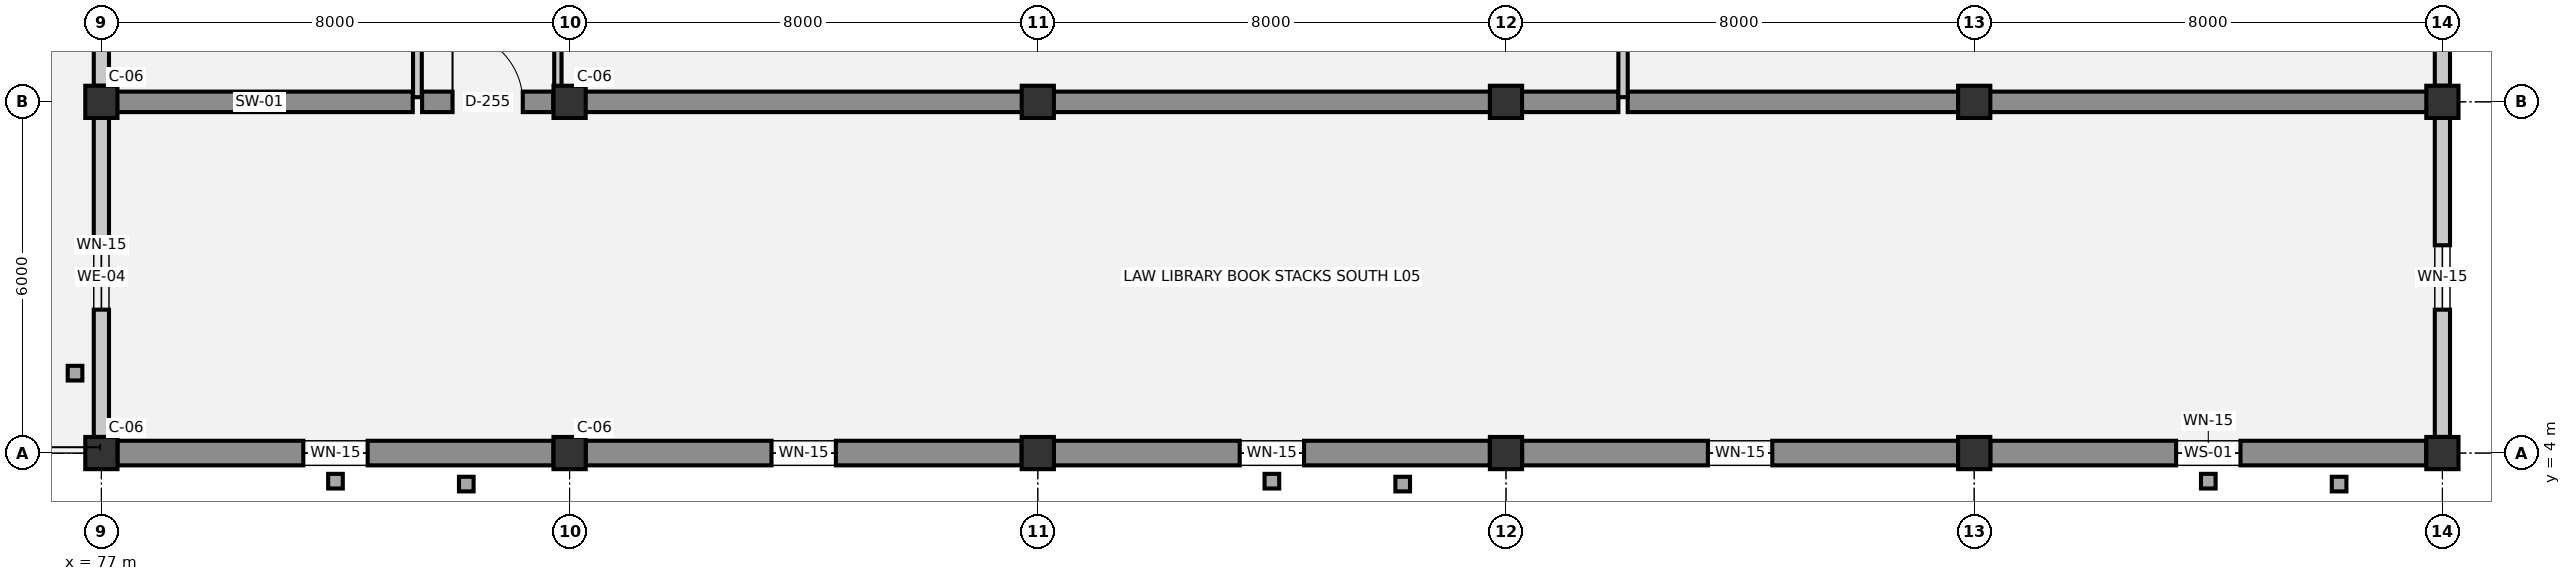
"""IFC4 building model, lengths in metres.
Left out: names, types, materials, properties, quantities, classifications, styles, units other than length and angle.
Written with IfcOpenShell. Run it as: python <this file> out.ifc"""

import sys

from ifc_helpers import new_model, si_unit, direction, frame, frame_2d, origin, origin_2d, place, context, subcontext, project, spatial, rectangle, extrude, element, fill, save


model = new_model("IFC4")
c1 = context("Model", 3, precision=1e-05, world=origin(), true_north=direction((0.0, 1.0)))
c2 = subcontext(c1, "Body", "Model", "MODEL_VIEW")
j1 = project(units=[si_unit("LENGTHUNIT", "METRE"), si_unit("PLANEANGLEUNIT", "RADIAN")], contexts=[c1])
p1 = place(None, origin())
s1 = spatial("IfcSite", under=j1, at=p1, CompositionType="ELEMENT")
p2 = place(p1, origin())
s2 = spatial("IfcBuilding", under=s1, at=p2, CompositionType="ELEMENT")
p3 = place(p2, frame((0.0, 0.0, 18.3)))
s3 = spatial("IfcBuildingStorey", under=s2, at=p3, CompositionType="ELEMENT", Elevation=18.3)
for number, where, z_axis, x_axis in (
    (1, (77.0, 4.0, 0.0), (0.0, 0.0, 1.0), (1.0, 0.0, 0.0)),
    (2, (77.0, 10.0, 0.0), (0.0, 0.0, 1.0), (1.0, 0.0, 0.0)),
    (3, (85.0, 4.0, 0.0), (0.0, 0.0, 1.0), (1.0, 0.0, 0.0)),
    (4, (85.0, 10.0, 0.0), (0.0, 0.0, 1.0), (1.0, 0.0, 0.0)),
    (5, (93.0, 4.0, 0.0), (0.0, 0.0, 1.0), (1.0, 0.0, 0.0)),
    (6, (93.0, 10.0, 0.0), (0.0, 0.0, 1.0), (1.0, 0.0, 0.0)),
    (7, (101.0, 4.0, 0.0), (0.0, 0.0, 1.0), (1.0, 0.0, 0.0)),
    (8, (101.0, 10.0, 0.0), (0.0, 0.0, 1.0), (1.0, 0.0, 0.0)),
    (9, (109.0, 4.0, 0.0), (0.0, 0.0, 1.0), (1.0, 0.0, 0.0)),
    (10, (109.0, 10.0, 0.0), (0.0, 0.0, 1.0), (1.0, 0.0, 0.0)),
    (11, (117.0, 4.0, 0.0), (0.0, 0.0, 1.0), (1.0, 0.0, 0.0)),
    (12, (117.0, 10.0, 0.0), (0.0, 0.0, 1.0), (1.0, 0.0, 0.0)),
):
    element("IfcColumn", number, at=place(p3, frame(where, z_axis=z_axis, x_axis=x_axis)), inside=s3, PredefinedType="COLUMN", context=c2, shape_type="SweptSolid", body=[
        extrude(rectangle(XDim=0.55, YDim=0.55, at=origin_2d()), origin(), (0.0, 0.0, 1.0), 3.75),
    ])
p4 = place(p3, frame((77.0, 4.275, 0.0), z_axis=(0.0, 0.0, 1.0), x_axis=(0.0, 1.0, 0.0)))
e13 = element("IfcWall", 13, at=p4, inside=s3, PredefinedType="SOLIDWALL", context=c2, shape_type="SweptSolid", body=[
    extrude(rectangle(XDim=5.45, YDim=0.26, at=frame_2d((2.725, 0.0))), origin(), (0.0, 0.0, 1.0), 2.69),
])
p5 = place(p4, frame((2.175, 0.0, 0.9)))
e14 = element("IfcOpeningElement", 14, at=p5, cuts=e13, PredefinedType="OPENING", context=c2, shape_type="SweptSolid", body=[
    extrude(rectangle(XDim=1.1, YDim=1.2, at=frame_2d((0.55, 0.6))), frame((0.0, 0.14, 0.0), z_axis=(0.0, -1.0, 0.0), x_axis=(1.0, 0.0, 0.0)), (0.0, 0.0, 1.0), 0.28),
])
p6 = place(p3, frame((77.0, 10.275, 0.0), z_axis=(0.0, 0.0, 1.0), x_axis=(0.0, 1.0, 0.0)))
e15 = element("IfcWall", 15, at=p6, inside=s3, PredefinedType="SOLIDWALL", context=c2, shape_type="SweptSolid", body=[
    extrude(rectangle(XDim=6.45, YDim=0.26, at=frame_2d((3.225, 0.0))), origin(), (0.0, 0.0, 1.0), 2.69),
])
p7 = place(p6, frame((2.125, 0.0, 0.9)))
e16 = element("IfcOpeningElement", 16, at=p7, cuts=e15, PredefinedType="OPENING", context=c2, shape_type="SweptSolid", body=[
    extrude(rectangle(XDim=2.2, YDim=1.0, at=frame_2d((1.1, 0.5))), frame((0.0, 0.14, 0.0), z_axis=(0.0, -1.0, 0.0), x_axis=(1.0, 0.0, 0.0)), (0.0, 0.0, 1.0), 0.28),
])
p8 = place(p3, frame((117.0, 16.725, 0.0), z_axis=(0.0, 0.0, 1.0), x_axis=(0.0, -1.0, 0.0)))
e17 = element("IfcWall", 17, at=p8, inside=s3, PredefinedType="SOLIDWALL", context=c2, shape_type="SweptSolid", body=[
    extrude(rectangle(XDim=6.45, YDim=0.26, at=frame_2d((3.225, 0.0))), origin(), (0.0, 0.0, 1.0), 2.69),
])
p9 = place(p8, frame((2.125, 0.0, 0.9)))
e18 = element("IfcOpeningElement", 18, at=p9, cuts=e17, PredefinedType="OPENING", context=c2, shape_type="SweptSolid", body=[
    extrude(rectangle(XDim=2.2, YDim=1.0, at=frame_2d((1.1, 0.5))), frame((0.0, 0.14, 0.0), z_axis=(0.0, -1.0, 0.0), x_axis=(1.0, 0.0, 0.0)), (0.0, 0.0, 1.0), 0.28),
])
p10 = place(p3, frame((117.0, 9.725, 0.0), z_axis=(0.0, 0.0, 1.0), x_axis=(0.0, -1.0, 0.0)))
e19 = element("IfcWall", 19, at=p10, inside=s3, PredefinedType="SOLIDWALL", context=c2, shape_type="SweptSolid", body=[
    extrude(rectangle(XDim=5.45, YDim=0.26, at=frame_2d((2.725, 0.0))), origin(), (0.0, 0.0, 1.0), 2.69),
])
p11 = place(p10, frame((2.175, 0.0, 0.9)))
e20 = element("IfcOpeningElement", 20, at=p11, cuts=e19, PredefinedType="OPENING", context=c2, shape_type="SweptSolid", body=[
    extrude(rectangle(XDim=1.1, YDim=1.2, at=frame_2d((0.55, 0.6))), frame((0.0, 0.14, 0.0), z_axis=(0.0, -1.0, 0.0), x_axis=(1.0, 0.0, 0.0)), (0.0, 0.0, 1.0), 0.28),
])
p12 = place(p3, frame((116.725, 4.0, 0.0), z_axis=(0.0, 0.0, 1.0), x_axis=(-1.0, 0.0, 0.0)))
e21 = element("IfcWall", 21, at=p12, inside=s3, PredefinedType="SOLIDWALL", context=c2, shape_type="SweptSolid", body=[
    extrude(rectangle(XDim=7.45, YDim=0.42, at=frame_2d((3.725, 0.0))), origin(), (0.0, 0.0, 1.0), 2.69),
])
p13 = place(p12, frame((3.175, 0.0, 0.9)))
e22 = element("IfcOpeningElement", 22, at=p13, cuts=e21, PredefinedType="OPENING", context=c2, shape_type="SweptSolid", body=[
    extrude(rectangle(XDim=1.1, YDim=1.2, at=frame_2d((0.55, 0.6))), frame((0.0, 0.22, 0.0), z_axis=(0.0, -1.0, 0.0), x_axis=(1.0, 0.0, 0.0)), (0.0, 0.0, 1.0), 0.44),
])
p14 = place(p3, frame((108.725, 4.0, 0.0), z_axis=(0.0, 0.0, 1.0), x_axis=(-1.0, 0.0, 0.0)))
e23 = element("IfcWall", 23, at=p14, inside=s3, PredefinedType="SOLIDWALL", context=c2, shape_type="SweptSolid", body=[
    extrude(rectangle(XDim=7.45, YDim=0.42, at=frame_2d((3.725, 0.0))), origin(), (0.0, 0.0, 1.0), 2.69),
])
p15 = place(p14, frame((3.175, 0.0, 0.9)))
e24 = element("IfcOpeningElement", 24, at=p15, cuts=e23, PredefinedType="OPENING", context=c2, shape_type="SweptSolid", body=[
    extrude(rectangle(XDim=1.1, YDim=1.2, at=frame_2d((0.55, 0.6))), frame((0.0, 0.22, 0.0), z_axis=(0.0, -1.0, 0.0), x_axis=(1.0, 0.0, 0.0)), (0.0, 0.0, 1.0), 0.44),
])
p16 = place(p3, frame((100.725, 4.0, 0.0), z_axis=(0.0, 0.0, 1.0), x_axis=(-1.0, 0.0, 0.0)))
e25 = element("IfcWall", 25, at=p16, inside=s3, PredefinedType="SOLIDWALL", context=c2, shape_type="SweptSolid", body=[
    extrude(rectangle(XDim=7.45, YDim=0.42, at=frame_2d((3.725, 0.0))), origin(), (0.0, 0.0, 1.0), 2.69),
])
p17 = place(p16, frame((3.175, 0.0, 0.9)))
e26 = element("IfcOpeningElement", 26, at=p17, cuts=e25, PredefinedType="OPENING", context=c2, shape_type="SweptSolid", body=[
    extrude(rectangle(XDim=1.1, YDim=1.2, at=frame_2d((0.55, 0.6))), frame((0.0, 0.22, 0.0), z_axis=(0.0, -1.0, 0.0), x_axis=(1.0, 0.0, 0.0)), (0.0, 0.0, 1.0), 0.44),
])
p18 = place(p3, frame((92.725, 4.0, 0.0), z_axis=(0.0, 0.0, 1.0), x_axis=(-1.0, 0.0, 0.0)))
e27 = element("IfcWall", 27, at=p18, inside=s3, PredefinedType="SOLIDWALL", context=c2, shape_type="SweptSolid", body=[
    extrude(rectangle(XDim=7.45, YDim=0.42, at=frame_2d((3.725, 0.0))), origin(), (0.0, 0.0, 1.0), 2.69),
])
p19 = place(p18, frame((3.175, 0.0, 0.9)))
e28 = element("IfcOpeningElement", 28, at=p19, cuts=e27, PredefinedType="OPENING", context=c2, shape_type="SweptSolid", body=[
    extrude(rectangle(XDim=1.1, YDim=1.2, at=frame_2d((0.55, 0.6))), frame((0.0, 0.22, 0.0), z_axis=(0.0, -1.0, 0.0), x_axis=(1.0, 0.0, 0.0)), (0.0, 0.0, 1.0), 0.44),
])
p20 = place(p3, frame((84.725, 4.0, 0.0), z_axis=(0.0, 0.0, 1.0), x_axis=(-1.0, 0.0, 0.0)))
e29 = element("IfcWall", 29, at=p20, inside=s3, PredefinedType="SOLIDWALL", context=c2, shape_type="SweptSolid", body=[
    extrude(rectangle(XDim=7.45, YDim=0.42, at=frame_2d((3.725, 0.0))), origin(), (0.0, 0.0, 1.0), 2.69),
])
p21 = place(p20, frame((3.175, 0.0, 0.9)))
e30 = element("IfcOpeningElement", 30, at=p21, cuts=e29, PredefinedType="OPENING", context=c2, shape_type="SweptSolid", body=[
    extrude(rectangle(XDim=1.1, YDim=1.2, at=frame_2d((0.55, 0.6))), frame((0.0, 0.22, 0.0), z_axis=(0.0, -1.0, 0.0), x_axis=(1.0, 0.0, 0.0)), (0.0, 0.0, 1.0), 0.44),
])
p22 = place(p3, frame((77.08, 10.0, 0.0), z_axis=(0.0, 0.0, 1.0), x_axis=(1.0, 0.0, 0.0)))
e31 = element("IfcWall", 31, at=p22, inside=s3, PredefinedType="SHEAR", context=c2, shape_type="SweptSolid", body=[
    extrude(rectangle(XDim=5.24, YDim=0.35, at=frame_2d((2.62, 0.0))), origin(), (0.0, 0.0, 1.0), 3.39),
])
p23 = place(p3, frame((82.48, 10.0, 0.0), z_axis=(0.0, 0.0, 1.0), x_axis=(1.0, 0.0, 0.0)))
e32 = element("IfcWall", 32, at=p23, inside=s3, PredefinedType="SHEAR", context=c2, shape_type="SweptSolid", body=[
    extrude(rectangle(XDim=2.24, YDim=0.35, at=frame_2d((1.12, 0.0))), origin(), (0.0, 0.0, 1.0), 3.39),
])
p24 = place(p23, frame((0.52, 0.0, 0.0)))
e33 = element("IfcOpeningElement", 33, at=p24, cuts=e32, PredefinedType="OPENING", context=c2, shape_type="SweptSolid", body=[
    extrude(rectangle(XDim=1.2, YDim=2.15, at=frame_2d((0.6, 1.075))), frame((0.0, 0.185, 0.0), z_axis=(0.0, -1.0, 0.0), x_axis=(1.0, 0.0, 0.0)), (0.0, 0.0, 1.0), 0.37),
])
p25 = place(p3, frame((84.88, 10.0, 0.0), z_axis=(0.0, 0.0, 1.0), x_axis=(1.0, 0.0, 0.0)))
e34 = element("IfcWall", 34, at=p25, inside=s3, PredefinedType="SHEAR", context=c2, shape_type="SweptSolid", body=[
    extrude(rectangle(XDim=18.04, YDim=0.35, at=frame_2d((9.02, 0.0))), origin(), (0.0, 0.0, 1.0), 3.39),
])
p26 = place(p3, frame((103.08, 10.0, 0.0), z_axis=(0.0, 0.0, 1.0), x_axis=(1.0, 0.0, 0.0)))
e35 = element("IfcWall", 35, at=p26, inside=s3, PredefinedType="SHEAR", context=c2, shape_type="SweptSolid", body=[
    extrude(rectangle(XDim=13.84, YDim=0.35, at=frame_2d((6.92, 0.0))), origin(), (0.0, 0.0, 1.0), 3.39),
])
p27 = place(p3, frame((82.4, 10.08, 0.0), z_axis=(0.0, 0.0, 1.0), x_axis=(0.0, 1.0, 0.0)))
e36 = element("IfcWall", 36, at=p27, inside=s3, PredefinedType="PARTITIONING", context=c2, shape_type="SweptSolid", body=[
    extrude(rectangle(XDim=14.84, YDim=0.15, at=frame_2d((7.42, 0.0))), origin(), (0.0, 0.0, 1.0), 3.39),
])
p28 = place(p27, frame((6.81, 0.0, 0.0)))
e37 = element("IfcOpeningElement", 37, at=p28, cuts=e36, PredefinedType="OPENING", context=c2, shape_type="SweptSolid", body=[
    extrude(rectangle(XDim=1.22, YDim=2.2, at=frame_2d((0.61, 1.1))), frame((0.0, 0.085, 0.0), z_axis=(0.0, -1.0, 0.0), x_axis=(1.0, 0.0, 0.0)), (0.0, 0.0, 1.0), 0.17),
])
p29 = place(p3, frame((84.8, 10.08, 0.0), z_axis=(0.0, 0.0, 1.0), x_axis=(0.0, 1.0, 0.0)))
e38 = element("IfcWall", 38, at=p29, inside=s3, PredefinedType="PARTITIONING", context=c2, shape_type="SweptSolid", body=[
    extrude(rectangle(XDim=14.84, YDim=0.125, at=frame_2d((7.42, 0.0))), origin(), (0.0, 0.0, 1.0), 2.86),
])
p30 = place(p29, frame((4.858, 0.0, 0.0)))
e39 = element("IfcOpeningElement", 39, at=p30, cuts=e38, PredefinedType="OPENING", context=c2, shape_type="SweptSolid", body=[
    extrude(rectangle(XDim=1.26, YDim=2.2, at=frame_2d((0.63, 1.1))), frame((0.0, 0.073, 0.0), z_axis=(0.0, -1.0, 0.0), x_axis=(1.0, 0.0, 0.0)), (0.0, 0.0, 1.0), 0.145),
])
p31 = place(p3, frame((103.0, 10.08, 0.0), z_axis=(0.0, 0.0, 1.0), x_axis=(0.0, 1.0, 0.0)))
e40 = element("IfcWall", 40, at=p31, inside=s3, PredefinedType="PARTITIONING", context=c2, shape_type="SweptSolid", body=[
    extrude(rectangle(XDim=14.84, YDim=0.16, at=frame_2d((7.42, 0.0))), origin(), (0.0, 0.0, 1.0), 3.39),
])
p32 = place(p5, origin())
e41 = element("IfcWindow", 41, at=p32, inside=s3, PartitioningType="SINGLE_PANEL", PredefinedType="WINDOW", context=c2, shape_type="SweptSolid", body=[
    extrude(rectangle(XDim=1.1, YDim=1.2, at=frame_2d((0.55, 0.6))), frame((0.0, 0.03, 0.0), z_axis=(0.0, -1.0, 0.0), x_axis=(1.0, 0.0, 0.0)), (0.0, 0.0, 1.0), 0.06),
])
fill(e14, e41)
p33 = place(p11, origin())
e42 = element("IfcWindow", 42, at=p33, inside=s3, PartitioningType="SINGLE_PANEL", PredefinedType="WINDOW", context=c2, shape_type="SweptSolid", body=[
    extrude(rectangle(XDim=1.1, YDim=1.2, at=frame_2d((0.55, 0.6))), frame((0.0, 0.03, 0.0), z_axis=(0.0, -1.0, 0.0), x_axis=(1.0, 0.0, 0.0)), (0.0, 0.0, 1.0), 0.06),
])
fill(e20, e42)
p34 = place(p13, origin())
e43 = element("IfcWindow", 43, at=p34, inside=s3, PartitioningType="SINGLE_PANEL", PredefinedType="WINDOW", context=c2, shape_type="SweptSolid", body=[
    extrude(rectangle(XDim=1.1, YDim=1.2, at=frame_2d((0.55, 0.6))), frame((0.0, 0.03, 0.0), z_axis=(0.0, -1.0, 0.0), x_axis=(1.0, 0.0, 0.0)), (0.0, 0.0, 1.0), 0.06),
])
fill(e22, e43)
p35 = place(p15, origin())
e44 = element("IfcWindow", 44, at=p35, inside=s3, PartitioningType="SINGLE_PANEL", PredefinedType="WINDOW", context=c2, shape_type="SweptSolid", body=[
    extrude(rectangle(XDim=1.1, YDim=1.2, at=frame_2d((0.55, 0.6))), frame((0.0, 0.03, 0.0), z_axis=(0.0, -1.0, 0.0), x_axis=(1.0, 0.0, 0.0)), (0.0, 0.0, 1.0), 0.06),
])
fill(e24, e44)
p36 = place(p17, origin())
e45 = element("IfcWindow", 45, at=p36, inside=s3, PartitioningType="SINGLE_PANEL", PredefinedType="WINDOW", context=c2, shape_type="SweptSolid", body=[
    extrude(rectangle(XDim=1.1, YDim=1.2, at=frame_2d((0.55, 0.6))), frame((0.0, 0.03, 0.0), z_axis=(0.0, -1.0, 0.0), x_axis=(1.0, 0.0, 0.0)), (0.0, 0.0, 1.0), 0.06),
])
fill(e26, e45)
p37 = place(p19, origin())
e46 = element("IfcWindow", 46, at=p37, inside=s3, PartitioningType="SINGLE_PANEL", PredefinedType="WINDOW", context=c2, shape_type="SweptSolid", body=[
    extrude(rectangle(XDim=1.1, YDim=1.2, at=frame_2d((0.55, 0.6))), frame((0.0, 0.03, 0.0), z_axis=(0.0, -1.0, 0.0), x_axis=(1.0, 0.0, 0.0)), (0.0, 0.0, 1.0), 0.06),
])
fill(e28, e46)
p38 = place(p21, origin())
e47 = element("IfcWindow", 47, at=p38, inside=s3, PartitioningType="SINGLE_PANEL", PredefinedType="WINDOW", context=c2, shape_type="SweptSolid", body=[
    extrude(rectangle(XDim=1.1, YDim=1.2, at=frame_2d((0.55, 0.6))), frame((0.0, 0.03, 0.0), z_axis=(0.0, -1.0, 0.0), x_axis=(1.0, 0.0, 0.0)), (0.0, 0.0, 1.0), 0.06),
])
fill(e30, e47)
p39 = place(p24, origin())
e48 = element("IfcDoor", 48, at=p39, inside=s3, OperationType="SINGLE_SWING_LEFT", PredefinedType="DOOR", context=c2, shape_type="SweptSolid", body=[
    extrude(rectangle(XDim=1.2, YDim=2.15, at=frame_2d((0.6, 1.075))), frame((0.0, 0.025, 0.0), z_axis=(0.0, -1.0, 0.0), x_axis=(1.0, 0.0, 0.0)), (0.0, 0.0, 1.0), 0.05),
])
fill(e33, e48)
save(model, sys.argv[1])
